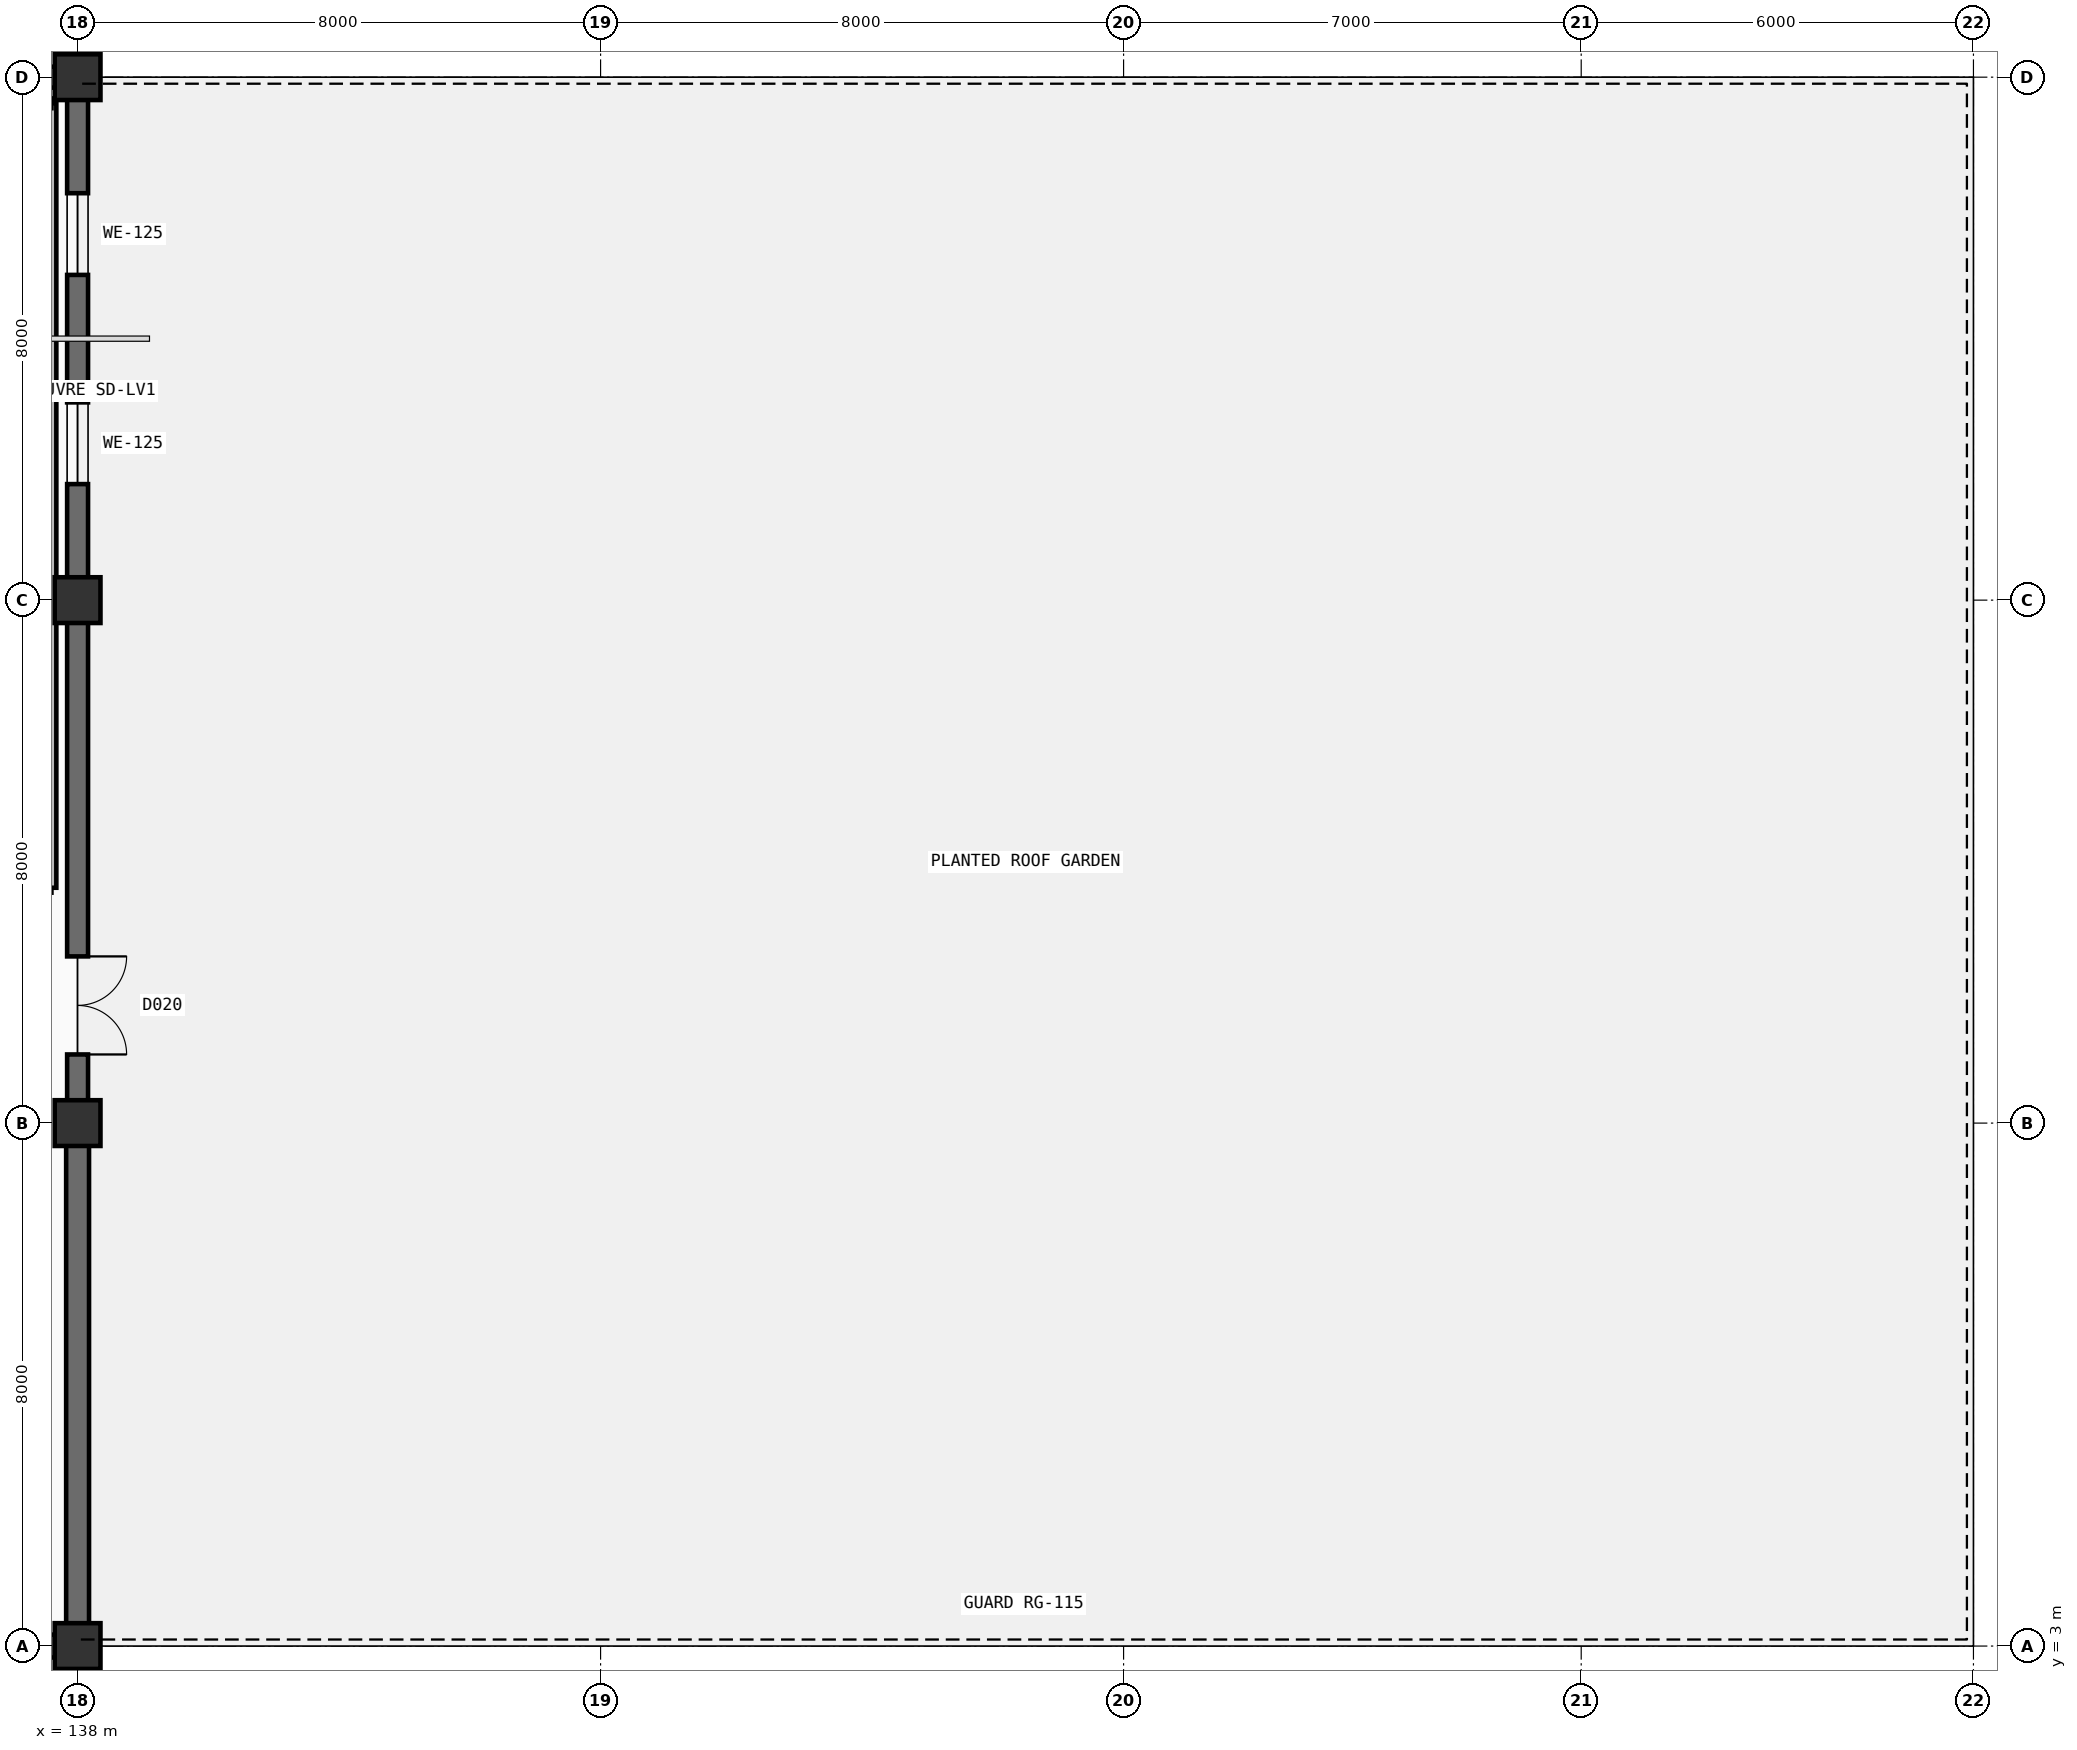
"""IFC4 building model, lengths in metres.
Left out: names, types, materials, properties, quantities, classifications, styles, units other than length and angle.
Written with IfcOpenShell. Run it as: python <this file> out.ifc"""

import sys

from ifc_helpers import new_model, si_unit, direction, frame, frame_2d, origin, origin_2d, place, context, subcontext, project, spatial, rectangle, extrude, element, fill, save


model = new_model("IFC4")
c1 = context("Model", 3, precision=1e-05, world=origin(), true_north=direction((0.0, 1.0)))
c2 = subcontext(c1, "Body", "Model", "MODEL_VIEW")
j1 = project(units=[si_unit("LENGTHUNIT", "METRE"), si_unit("PLANEANGLEUNIT", "RADIAN")], contexts=[c1])
p1 = place(None, origin())
s1 = spatial("IfcSite", under=j1, at=p1, CompositionType="ELEMENT")
p2 = place(p1, origin())
s2 = spatial("IfcBuilding", under=s1, at=p2, CompositionType="ELEMENT")
p3 = place(p2, frame((0.0, 0.0, 9.9)))
s3 = spatial("IfcBuildingStorey", under=s2, at=p3, CompositionType="ELEMENT", Elevation=9.9)
for number, where, z_axis, x_axis in (
    (1, (138.0, 3.0, 0.0), (0.0, 0.0, 1.0), (1.0, 0.0, 0.0)),
    (2, (138.0, 11.0, 0.0), (0.0, 0.0, 1.0), (1.0, 0.0, 0.0)),
    (3, (138.0, 19.0, 0.0), (0.0, 0.0, 1.0), (1.0, 0.0, 0.0)),
    (4, (138.0, 27.0, 0.0), (0.0, 0.0, 1.0), (1.0, 0.0, 0.0)),
):
    element("IfcColumn", number, at=place(p3, frame(where, z_axis=z_axis, x_axis=x_axis)), inside=s3, PredefinedType="COLUMN", context=c2, shape_type="SweptSolid", body=[
        extrude(rectangle(XDim=0.7, YDim=0.7, at=origin_2d()), origin(), (0.0, 0.0, 1.0), 4.5),
    ])
p4 = place(p3, frame((130.0, 27.0, 0.0), z_axis=(0.0, 0.0, 1.0), x_axis=(1.0, 0.0, 0.0)))
e5 = element("IfcWall", 5, at=p4, inside=s3, PredefinedType="SOLIDWALL", context=c2, shape_type="SweptSolid", body=[
    extrude(rectangle(XDim=8.0, YDim=0.32, at=frame_2d((4.0, 0.0))), origin(), (0.0, 0.0, 1.0), 4.5),
])
p5 = place(p4, frame((1.7, 0.0, 1.0)))
e6 = element("IfcOpeningElement", 6, at=p5, cuts=e5, PredefinedType="OPENING", context=c2, shape_type="SweptSolid", body=[
    extrude(rectangle(XDim=1.4, YDim=1.75, at=frame_2d((0.7, 0.875))), frame((0.0, 0.17, 0.0), z_axis=(0.0, -1.0, 0.0), x_axis=(1.0, 0.0, 0.0)), (0.0, 0.0, 1.0), 0.34),
])
p6 = place(p4, frame((4.9, 0.0, 1.0)))
e7 = element("IfcOpeningElement", 7, at=p6, cuts=e5, PredefinedType="OPENING", context=c2, shape_type="SweptSolid", body=[
    extrude(rectangle(XDim=1.4, YDim=1.75, at=frame_2d((0.7, 0.875))), frame((0.0, 0.17, 0.0), z_axis=(0.0, -1.0, 0.0), x_axis=(1.0, 0.0, 0.0)), (0.0, 0.0, 1.0), 0.34),
])
p7 = place(p3, frame((138.0, 27.0, 0.0), z_axis=(0.0, 0.0, 1.0), x_axis=(0.0, -1.0, 0.0)))
e8 = element("IfcWall", 8, at=p7, inside=s3, PredefinedType="SOLIDWALL", context=c2, shape_type="SweptSolid", body=[
    extrude(rectangle(XDim=8.0, YDim=0.32, at=frame_2d((4.0, 0.0))), origin(), (0.0, 0.0, 1.0), 4.5),
])
p8 = place(p7, frame((1.775, 0.0, 1.0)))
e9 = element("IfcOpeningElement", 9, at=p8, cuts=e8, PredefinedType="OPENING", context=c2, shape_type="SweptSolid", body=[
    extrude(rectangle(XDim=1.25, YDim=1.6, at=frame_2d((0.625, 0.8))), frame((0.0, 0.17, 0.0), z_axis=(0.0, -1.0, 0.0), x_axis=(1.0, 0.0, 0.0)), (0.0, 0.0, 1.0), 0.34),
])
p9 = place(p7, frame((4.975, 0.0, 1.0)))
e10 = element("IfcOpeningElement", 10, at=p9, cuts=e8, PredefinedType="OPENING", context=c2, shape_type="SweptSolid", body=[
    extrude(rectangle(XDim=1.25, YDim=1.6, at=frame_2d((0.625, 0.8))), frame((0.0, 0.17, 0.0), z_axis=(0.0, -1.0, 0.0), x_axis=(1.0, 0.0, 0.0)), (0.0, 0.0, 1.0), 0.34),
])
p10 = place(p3, frame((138.0, 19.0, 0.0), z_axis=(0.0, 0.0, 1.0), x_axis=(0.0, -1.0, 0.0)))
e11 = element("IfcWall", 11, at=p10, inside=s3, PredefinedType="SOLIDWALL", context=c2, shape_type="SweptSolid", body=[
    extrude(rectangle(XDim=8.0, YDim=0.32, at=frame_2d((4.0, 0.0))), origin(), (0.0, 0.0, 1.0), 4.5),
])
p11 = place(p10, frame((5.45, 0.0, 0.0)))
e12 = element("IfcOpeningElement", 12, at=p11, cuts=e11, PredefinedType="OPENING", context=c2, shape_type="SweptSolid", body=[
    extrude(rectangle(XDim=1.5, YDim=2.25, at=frame_2d((0.75, 1.125))), frame((0.0, 0.17, 0.0), z_axis=(0.0, -1.0, 0.0), x_axis=(1.0, 0.0, 0.0)), (0.0, 0.0, 1.0), 0.34),
])
for number, where, z_axis, x_axis in (
    (13, (138.0, 11.0, 0.0), (0.0, 0.0, 1.0), (0.0, -1.0, 0.0)),
    (14, (138.0, 3.0, 0.0), (0.0, 0.0, 1.0), (-1.0, 0.0, 0.0)),
):
    element("IfcWall", number, at=place(p3, frame(where, z_axis=z_axis, x_axis=x_axis)), inside=s3, PredefinedType="SHEAR", context=c2, shape_type="SweptSolid", body=[
        extrude(rectangle(XDim=8.0, YDim=0.35, at=frame_2d((4.0, 0.0))), origin(), (0.0, 0.0, 1.0), 4.5),
    ])
p12 = place(p3, frame((137.6, 14.6, 0.0), z_axis=(0.0, 0.0, 1.0), x_axis=(0.0, 1.0, 0.0)))
e15 = element("IfcWall", 15, at=p12, inside=s3, PredefinedType="PARTITIONING", context=c2, shape_type="SweptSolid", body=[
    extrude(rectangle(XDim=12.0, YDim=0.15, at=frame_2d((6.0, 0.0))), origin(), (0.0, 0.0, 1.0), 4.2),
])
p13 = place(p8, origin())
e16 = element("IfcWindow", 16, at=p13, inside=s3, PartitioningType="SINGLE_PANEL", PredefinedType="WINDOW", context=c2, shape_type="SweptSolid", body=[
    extrude(rectangle(XDim=1.25, YDim=1.6, at=frame_2d((0.625, 0.8))), frame((0.0, 0.03, 0.0), z_axis=(0.0, -1.0, 0.0), x_axis=(1.0, 0.0, 0.0)), (0.0, 0.0, 1.0), 0.06),
])
fill(e9, e16)
p14 = place(p9, origin())
e17 = element("IfcWindow", 17, at=p14, inside=s3, PartitioningType="SINGLE_PANEL", PredefinedType="WINDOW", context=c2, shape_type="SweptSolid", body=[
    extrude(rectangle(XDim=1.25, YDim=1.6, at=frame_2d((0.625, 0.8))), frame((0.0, 0.03, 0.0), z_axis=(0.0, -1.0, 0.0), x_axis=(1.0, 0.0, 0.0)), (0.0, 0.0, 1.0), 0.06),
])
fill(e10, e17)
p15 = place(p11, origin())
e18 = element("IfcDoor", 18, at=p15, inside=s3, OperationType="DOUBLE_DOOR_SINGLE_SWING", PredefinedType="DOOR", context=c2, shape_type="SweptSolid", body=[
    extrude(rectangle(XDim=1.5, YDim=2.25, at=frame_2d((0.75, 1.125))), frame((0.0, 0.025, 0.0), z_axis=(0.0, -1.0, 0.0), x_axis=(1.0, 0.0, 0.0)), (0.0, 0.0, 1.0), 0.05),
])
fill(e12, e18)
save(model, sys.argv[1])
